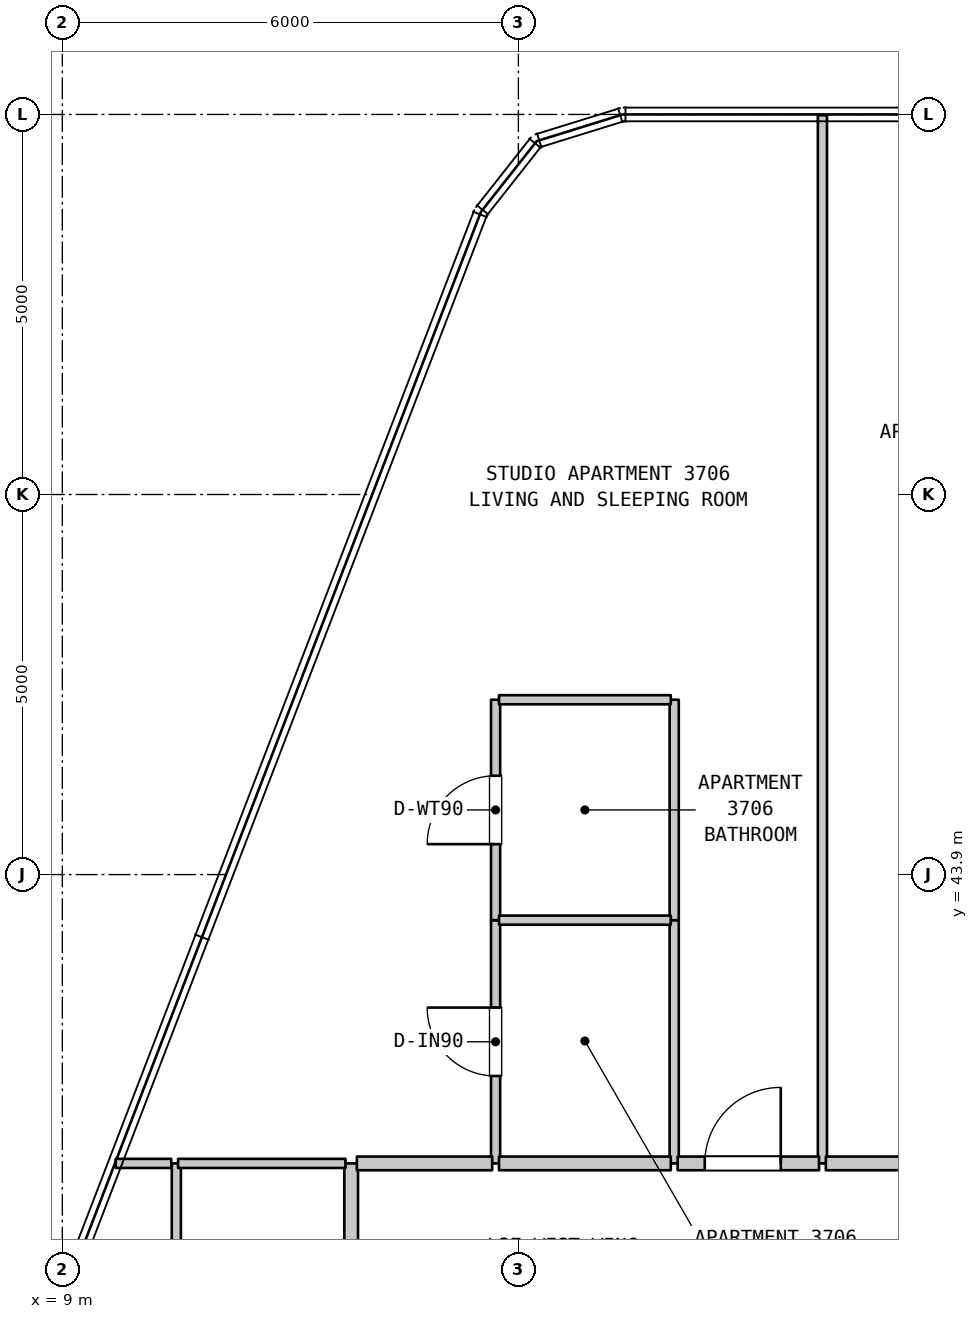
"""IFC4 building model, lengths in metres.
Left out: names, types, materials, properties, quantities, classifications, styles, units other than length and angle.
Written with IfcOpenShell. Run it as: python <this file> out.ifc"""

import sys

from ifc_helpers import new_model, si_unit, direction, frame, frame_2d, origin, place, context, subcontext, project, spatial, rectangle, extrude, element, fill, save


model = new_model("IFC4")
c1 = context("Model", 3, precision=1e-05, world=origin(), true_north=direction((0.0, 1.0)))
c2 = subcontext(c1, "Body", "Model", "MODEL_VIEW")
j1 = project(units=[si_unit("LENGTHUNIT", "METRE"), si_unit("PLANEANGLEUNIT", "RADIAN")], contexts=[c1])
p1 = place(None, origin())
s1 = spatial("IfcSite", under=j1, at=p1, CompositionType="ELEMENT")
p2 = place(p1, origin())
s2 = spatial("IfcBuilding", under=s1, at=p2, CompositionType="ELEMENT")
p3 = place(p2, frame((0.0, 0.0, 152.0)))
s3 = spatial("IfcBuildingStorey", under=s2, at=p3, CompositionType="ELEMENT", Elevation=152.0)
p4 = place(p3, frame((10.5, 35.55, 0.0), z_axis=(0.0, 0.0, 1.0), x_axis=(0.0, 1.0, 0.0)))
e1 = element("IfcWall", 1, at=p4, inside=s3, PredefinedType="PARTITIONING", context=c2, shape_type="SweptSolid", body=[
    extrude(rectangle(XDim=4.55, YDim=0.12, at=frame_2d((2.275, 0.0))), origin(), (0.0, 0.0, 1.0), 3.385),
])
p5 = place(p3, frame((12.8, 35.55, 0.0), z_axis=(0.0, 0.0, 1.0), x_axis=(0.0, 1.0, 0.0)))
e2 = element("IfcWall", 2, at=p5, inside=s3, PredefinedType="STANDARD", context=c2, shape_type="SweptSolid", body=[
    extrude(rectangle(XDim=4.55, YDim=0.18, at=frame_2d((2.275, 0.0))), origin(), (0.0, 0.0, 1.0), 3.385),
])
p6 = place(p3, frame((14.7, 40.1, 0.0), z_axis=(0.0, 0.0, 1.0), x_axis=(0.0, 1.0, 0.0)))
e3 = element("IfcWall", 3, at=p6, inside=s3, PredefinedType="PARTITIONING", context=c2, shape_type="SweptSolid", body=[
    extrude(rectangle(XDim=3.2, YDim=0.12, at=frame_2d((1.6, 0.0))), origin(), (0.0, 0.0, 1.0), 3.385),
])
p7 = place(p6, frame((1.15, 0.0, 0.0)))
e4 = element("IfcOpeningElement", 4, at=p7, cuts=e3, PredefinedType="OPENING", context=c2, shape_type="SweptSolid", body=[
    extrude(rectangle(XDim=0.9, YDim=2.15, at=frame_2d((0.45, 1.075))), frame((0.0, 0.07, 0.0), z_axis=(0.0, -1.0, 0.0), x_axis=(1.0, 0.0, 0.0)), (0.0, 0.0, 1.0), 0.14),
])
p8 = place(p3, frame((14.7, 43.3, 0.0), z_axis=(0.0, 0.0, 1.0), x_axis=(0.0, 1.0, 0.0)))
e5 = element("IfcWall", 5, at=p8, inside=s3, PredefinedType="PARTITIONING", context=c2, shape_type="SweptSolid", body=[
    extrude(rectangle(XDim=2.9, YDim=0.12, at=frame_2d((1.45, 0.0))), origin(), (0.0, 0.0, 1.0), 3.385),
])
p9 = place(p8, frame((1.0, 0.0, 0.0)))
e6 = element("IfcOpeningElement", 6, at=p9, cuts=e5, PredefinedType="OPENING", context=c2, shape_type="SweptSolid", body=[
    extrude(rectangle(XDim=0.9, YDim=2.1, at=frame_2d((0.45, 1.05))), frame((0.0, 0.07, 0.0), z_axis=(0.0, -1.0, 0.0), x_axis=(1.0, 0.0, 0.0)), (0.0, 0.0, 1.0), 0.14),
])
p10 = place(p3, frame((17.05, 40.1, 0.0), z_axis=(0.0, 0.0, 1.0), x_axis=(0.0, 1.0, 0.0)))
e7 = element("IfcWall", 7, at=p10, inside=s3, PredefinedType="PARTITIONING", context=c2, shape_type="SweptSolid", body=[
    extrude(rectangle(XDim=3.2, YDim=0.12, at=frame_2d((1.6, 0.0))), origin(), (0.0, 0.0, 1.0), 3.385),
])
p11 = place(p3, frame((17.05, 43.3, 0.0), z_axis=(0.0, 0.0, 1.0), x_axis=(0.0, 1.0, 0.0)))
e8 = element("IfcWall", 8, at=p11, inside=s3, PredefinedType="PARTITIONING", context=c2, shape_type="SweptSolid", body=[
    extrude(rectangle(XDim=2.9, YDim=0.12, at=frame_2d((1.45, 0.0))), origin(), (0.0, 0.0, 1.0), 3.385),
])
p12 = place(p3, frame((19.0, 40.1, 0.0), z_axis=(0.0, 0.0, 1.0), x_axis=(0.0, 1.0, 0.0)))
e9 = element("IfcWall", 9, at=p12, inside=s3, PredefinedType="PARTITIONING", context=c2, shape_type="SweptSolid", body=[
    extrude(rectangle(XDim=13.79, YDim=0.12, at=frame_2d((6.895, 0.0))), origin(), (0.0, 0.0, 1.0), 3.385),
])
p13 = place(p3, frame((9.702, 40.1, 0.0), z_axis=(0.0, 0.0, 1.0), x_axis=(1.0, 0.0, 0.0)))
e10 = element("IfcWall", 10, at=p13, inside=s3, PredefinedType="PARTITIONING", context=c2, shape_type="SweptSolid", body=[
    extrude(rectangle(XDim=0.731, YDim=0.12, at=frame_2d((0.366, 0.0))), origin(), (0.0, 0.0, 1.0), 3.385),
])
p14 = place(p3, frame((10.523, 40.1, 0.0), z_axis=(0.0, 0.0, 1.0), x_axis=(1.0, 0.0, 0.0)))
e11 = element("IfcWall", 11, at=p14, inside=s3, PredefinedType="PARTITIONING", context=c2, shape_type="SweptSolid", body=[
    extrude(rectangle(XDim=2.202, YDim=0.12, at=frame_2d((1.101, 0.0))), origin(), (0.0, 0.0, 1.0), 3.385),
])
p15 = place(p3, frame((12.875, 40.1, 0.0), z_axis=(0.0, 0.0, 1.0), x_axis=(1.0, 0.0, 0.0)))
e12 = element("IfcWall", 12, at=p15, inside=s3, PredefinedType="STANDARD", context=c2, shape_type="SweptSolid", body=[
    extrude(rectangle(XDim=1.78, YDim=0.18, at=frame_2d((0.89, 0.0))), origin(), (0.0, 0.0, 1.0), 3.385),
])
p16 = place(p3, frame((14.745, 40.1, 0.0), z_axis=(0.0, 0.0, 1.0), x_axis=(1.0, 0.0, 0.0)))
e13 = element("IfcWall", 13, at=p16, inside=s3, PredefinedType="STANDARD", context=c2, shape_type="SweptSolid", body=[
    extrude(rectangle(XDim=2.26, YDim=0.18, at=frame_2d((1.13, 0.0))), origin(), (0.0, 0.0, 1.0), 3.385),
])
p17 = place(p3, frame((17.095, 40.1, 0.0), z_axis=(0.0, 0.0, 1.0), x_axis=(1.0, 0.0, 0.0)))
e14 = element("IfcWall", 14, at=p17, inside=s3, PredefinedType="STANDARD", context=c2, shape_type="SweptSolid", body=[
    extrude(rectangle(XDim=1.86, YDim=0.18, at=frame_2d((0.93, 0.0))), origin(), (0.0, 0.0, 1.0), 3.385),
])
p18 = place(p17, frame((0.357, 0.0, 0.0)))
e15 = element("IfcOpeningElement", 15, at=p18, cuts=e14, PredefinedType="OPENING", context=c2, shape_type="SweptSolid", body=[
    extrude(rectangle(XDim=1.0, YDim=2.15, at=frame_2d((0.5, 1.075))), frame((0.0, 0.1, 0.0), z_axis=(0.0, -1.0, 0.0), x_axis=(1.0, 0.0, 0.0)), (0.0, 0.0, 1.0), 0.2),
])
p19 = place(p3, frame((19.045, 40.1, 0.0), z_axis=(0.0, 0.0, 1.0), x_axis=(1.0, 0.0, 0.0)))
e16 = element("IfcWall", 16, at=p19, inside=s3, PredefinedType="STANDARD", context=c2, shape_type="SweptSolid", body=[
    extrude(rectangle(XDim=3.51, YDim=0.18, at=frame_2d((1.755, 0.0))), origin(), (0.0, 0.0, 1.0), 3.385),
])
p20 = place(p19, frame((1.185, 0.0, 0.0)))
e17 = element("IfcOpeningElement", 17, at=p20, cuts=e16, PredefinedType="OPENING", context=c2, shape_type="SweptSolid", body=[
    extrude(rectangle(XDim=1.0, YDim=2.15, at=frame_2d((0.5, 1.075))), frame((0.0, 0.1, 0.0), z_axis=(0.0, -1.0, 0.0), x_axis=(1.0, 0.0, 0.0)), (0.0, 0.0, 1.0), 0.2),
])
for number, where, z_axis, x_axis in (
    (18, (14.745, 43.3, 0.0), (0.0, 0.0, 1.0), (1.0, 0.0, 0.0)),
    (19, (14.745, 46.2, 0.0), (0.0, 0.0, 1.0), (1.0, 0.0, 0.0)),
):
    element("IfcWall", number, at=place(p3, frame(where, z_axis=z_axis, x_axis=x_axis)), inside=s3, PredefinedType="PARTITIONING", context=c2, shape_type="SweptSolid", body=[
        extrude(rectangle(XDim=2.26, YDim=0.12, at=frame_2d((1.13, 0.0))), origin(), (0.0, 0.0, 1.0), 3.385),
    ])
p21 = place(p7, origin())
e20 = element("IfcDoor", 20, at=p21, inside=s3, OperationType="SINGLE_SWING_RIGHT", PredefinedType="DOOR", context=c2, shape_type="SweptSolid", body=[
    extrude(rectangle(XDim=0.9, YDim=2.15, at=frame_2d((0.45, 1.075))), frame((0.0, 0.025, 0.0), z_axis=(0.0, -1.0, 0.0), x_axis=(1.0, 0.0, 0.0)), (0.0, 0.0, 1.0), 0.05),
])
fill(e4, e20)
p22 = place(p9, origin())
e21 = element("IfcDoor", 21, at=p22, inside=s3, OperationType="SINGLE_SWING_LEFT", PredefinedType="DOOR", context=c2, shape_type="SweptSolid", body=[
    extrude(rectangle(XDim=0.9, YDim=2.1, at=frame_2d((0.45, 1.05))), frame((0.0, 0.025, 0.0), z_axis=(0.0, -1.0, 0.0), x_axis=(1.0, 0.0, 0.0)), (0.0, 0.0, 1.0), 0.05),
])
fill(e6, e21)
p23 = place(p18, origin())
e22 = element("IfcDoor", 22, at=p23, inside=s3, OperationType="SINGLE_SWING_RIGHT", PredefinedType="DOOR", context=c2, shape_type="SweptSolid", body=[
    extrude(rectangle(XDim=1.0, YDim=2.15, at=frame_2d((0.5, 1.075))), frame((0.0, 0.025, 0.0), z_axis=(0.0, -1.0, 0.0), x_axis=(1.0, 0.0, 0.0)), (0.0, 0.0, 1.0), 0.05),
])
fill(e15, e22)
save(model, sys.argv[1])
